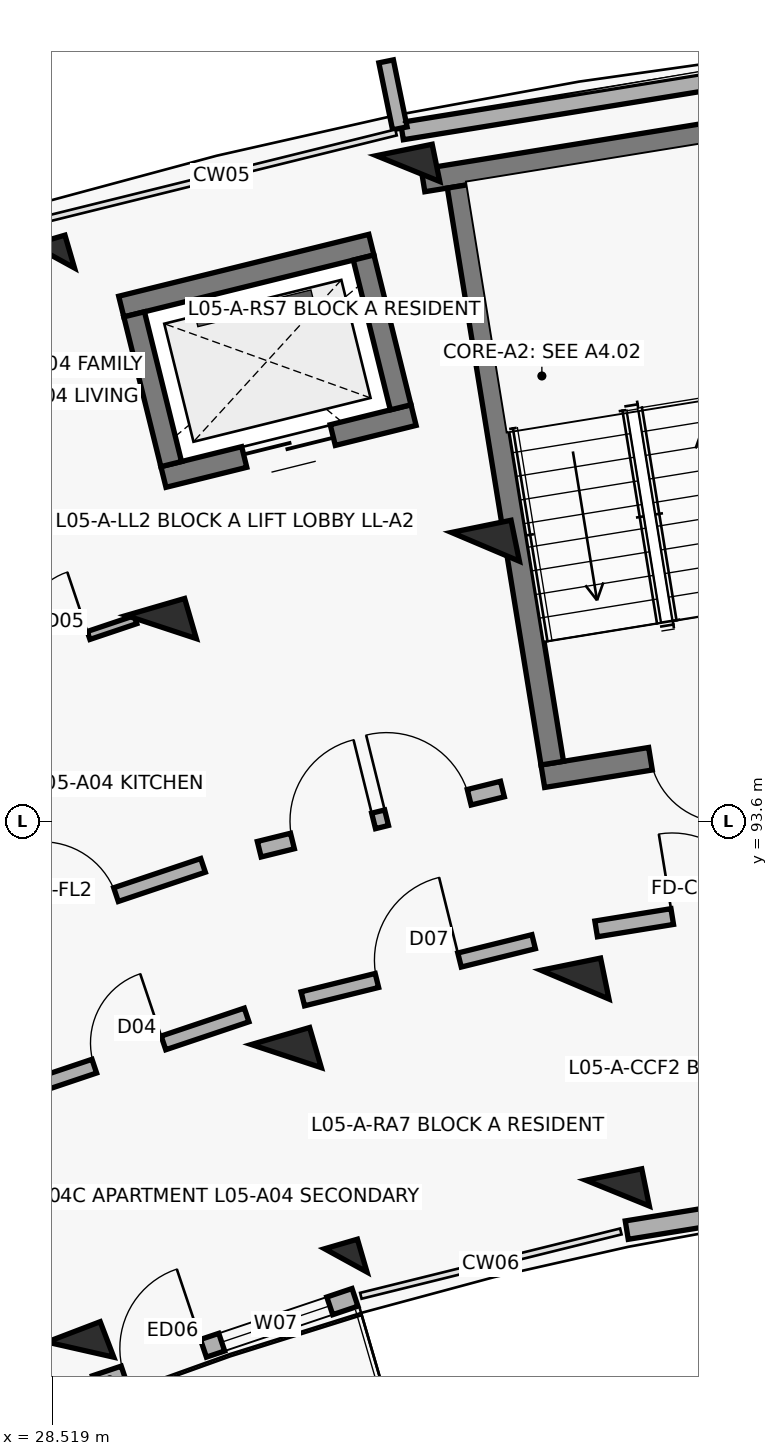
"""IFC4 building model, lengths in metres.
Left out: names, types, materials, properties, quantities, classifications, styles, units other than length and angle.
Written with IfcOpenShell. Run it as: python <this file> out.ifc"""

import sys

from ifc_helpers import new_model, si_unit, direction, frame, frame_2d, origin, origin_2d, place, context, subcontext, project, spatial, rectangle, extrude, element, fill, save


model = new_model("IFC4")
c1 = context("Model", 3, precision=1e-05, world=origin(), true_north=direction((0.0, 1.0)))
c2 = subcontext(c1, "Body", "Model", "MODEL_VIEW")
j1 = project(units=[si_unit("LENGTHUNIT", "METRE"), si_unit("PLANEANGLEUNIT", "RADIAN")], contexts=[c1])
p1 = place(None, origin())
s1 = spatial("IfcSite", under=j1, at=p1, CompositionType="ELEMENT")
p2 = place(p1, origin())
s2 = spatial("IfcBuilding", under=s1, at=p2, CompositionType="ELEMENT")
p3 = place(p2, frame((0.0, 0.0, 17.4)))
s3 = spatial("IfcBuildingStorey", under=s2, at=p3, CompositionType="ELEMENT", Elevation=17.4)
p4 = place(p3, frame((28.889, 86.646, 0.0), z_axis=(0.0, 0.0, 1.0), x_axis=(-0.357064076459, 0.934079892355, 0.0)))
e1 = element("IfcColumn", 1, at=p4, inside=s3, PredefinedType="COLUMN", context=c2, shape_type="SweptSolid", body=[
    extrude(rectangle(XDim=0.5, YDim=0.75, at=origin_2d()), origin(), (0.0, 0.0, 1.0), 3.1),
])
p5 = place(p3, frame((32.382, 87.82, 0.0), z_axis=(0.0, 0.0, 1.0), x_axis=(-0.27966144946, 0.96009867914, 0.0)))
e2 = element("IfcColumn", 2, at=p5, inside=s3, PredefinedType="COLUMN", context=c2, shape_type="SweptSolid", body=[
    extrude(rectangle(XDim=0.45, YDim=0.45, at=origin_2d()), origin(), (0.0, 0.0, 1.0), 3.1),
])
for number, where, z_axis, x_axis in (
    (3, (31.599, 90.508, 0.0), (0.0, 0.0, 1.0), (-0.28, 0.96, 0.0)),
    (4, (29.954, 96.153, 0.0), (0.0, 0.0, 1.0), (-0.28, 0.96, 0.0)),
):
    element("IfcColumn", number, at=place(p3, frame(where, z_axis=z_axis, x_axis=x_axis)), inside=s3, PredefinedType="COLUMN", context=c2, shape_type="SweptSolid", body=[
        extrude(rectangle(XDim=0.55, YDim=0.8, at=origin_2d()), origin(), (0.0, 0.0, 1.0), 3.1),
    ])
p6 = place(p3, frame((28.533, 101.031, 0.0), z_axis=(0.0, 0.0, 1.0), x_axis=(-0.27966144946, 0.96009867914, 0.0)))
e5 = element("IfcColumn", 5, at=p6, inside=s3, PredefinedType="COLUMN", context=c2, shape_type="SweptSolid", body=[
    extrude(rectangle(XDim=0.45, YDim=0.45, at=origin_2d()), origin(), (0.0, 0.0, 1.0), 3.1),
])
p7 = place(p3, frame((35.958, 88.705, 0.0), z_axis=(0.0, 0.0, 1.0), x_axis=(-0.200393999665, 0.979715389742, 0.0)))
e6 = element("IfcColumn", 6, at=p7, inside=s3, PredefinedType="COLUMN", context=c2, shape_type="SweptSolid", body=[
    extrude(rectangle(XDim=0.5, YDim=0.75, at=origin_2d()), origin(), (0.0, 0.0, 1.0), 3.1),
])
for number, where, z_axis, x_axis in (
    (7, (35.397, 91.448, 0.0), (0.0, 0.0, 1.0), (-0.2, 0.98, 0.0)),
    (8, (34.219, 97.209, 0.0), (0.0, 0.0, 1.0), (-0.2, 0.98, 0.0)),
):
    element("IfcColumn", number, at=place(p3, frame(where, z_axis=z_axis, x_axis=x_axis)), inside=s3, PredefinedType="COLUMN", context=c2, shape_type="SweptSolid", body=[
        extrude(rectangle(XDim=0.55, YDim=0.8, at=origin_2d()), origin(), (0.0, 0.0, 1.0), 3.1),
    ])
p8 = place(p3, frame((33.201, 102.186, 0.0), z_axis=(0.0, 0.0, 1.0), x_axis=(-0.200393999665, 0.979715389742, 0.0)))
e9 = element("IfcColumn", 9, at=p8, inside=s3, PredefinedType="COLUMN", context=c2, shape_type="SweptSolid", body=[
    extrude(rectangle(XDim=0.5, YDim=0.75, at=origin_2d()), origin(), (0.0, 0.0, 1.0), 3.1),
])
p9 = place(p3, frame((29.087, 86.185, 0.0), z_axis=(0.0, 0.0, 1.0), x_axis=(0.947880824442, 0.318625081649, 0.0)))
e10 = element("IfcWall", 10, at=p9, inside=s3, PredefinedType="SOLIDWALL", context=c2, shape_type="SweptSolid", body=[
    extrude(rectangle(XDim=3.604, YDim=0.245, at=frame_2d((1.802, 0.0))), origin(), (0.0, 0.0, 1.0), 2.25),
])
p10 = place(p9, frame((0.4, 0.0, 0.0)))
e11 = element("IfcOpeningElement", 11, at=p10, cuts=e10, PredefinedType="OPENING", context=c2, shape_type="SweptSolid", body=[
    extrude(rectangle(XDim=1.1, YDim=2.15, at=frame_2d((0.55, 1.075))), frame((0.0, 0.133, 0.0), z_axis=(0.0, -1.0, 0.0), x_axis=(1.0, 0.0, 0.0)), (0.0, 0.0, 1.0), 0.265),
])
p11 = place(p9, frame((1.754, 0.0, 0.35)))
e12 = element("IfcOpeningElement", 12, at=p11, cuts=e10, PredefinedType="OPENING", context=c2, shape_type="SweptSolid", body=[
    extrude(rectangle(XDim=1.5, YDim=1.65, at=frame_2d((0.75, 0.825))), frame((0.0, 0.133, 0.0), z_axis=(0.0, -1.0, 0.0), x_axis=(1.0, 0.0, 0.0)), (0.0, 0.0, 1.0), 0.265),
])
p12 = place(p3, frame((33.12, 102.679, 0.0), z_axis=(0.0, 0.0, 1.0), x_axis=(0.987080750493, 0.160223568819, 0.0)))
e13 = element("IfcWall", 13, at=p12, inside=s3, PredefinedType="SOLIDWALL", context=c2, shape_type="SweptSolid", body=[
    extrude(rectangle(XDim=4.809, YDim=0.23, at=frame_2d((2.404, 0.0))), origin(), (0.0, 0.0, 1.0), 2.25),
])
p13 = place(p3, frame((33.093, 102.715, 0.0), z_axis=(0.0, 0.0, 1.0), x_axis=(-0.200183211319, 0.979758481416, 0.0)))
e14 = element("IfcWall", 14, at=p13, inside=s3, PredefinedType="PARAPET", context=c2, shape_type="SweptSolid", body=[
    extrude(rectangle(XDim=0.9, YDim=0.195, at=frame_2d((0.45, 0.0))), origin(), (0.0, 0.0, 1.0), 2.25),
])
p14 = place(p3, frame((36.078, 88.218, 0.0), z_axis=(0.0, 0.0, 1.0), x_axis=(0.987080874485, 0.160222804952, 0.0)))
e15 = element("IfcWall", 15, at=p14, inside=s3, PredefinedType="SOLIDWALL", context=c2, shape_type="SweptSolid", body=[
    extrude(rectangle(XDim=3.604, YDim=0.245, at=frame_2d((1.802, 0.0))), origin(), (0.0, 0.0, 1.0), 2.25),
])
p15 = place(p14, frame((1.002, 0.0, 0.32)))
e16 = element("IfcOpeningElement", 16, at=p15, cuts=e15, PredefinedType="OPENING", context=c2, shape_type="SweptSolid", body=[
    extrude(rectangle(XDim=1.6, YDim=1.5, at=frame_2d((0.8, 0.75))), frame((0.0, 0.133, 0.0), z_axis=(0.0, -1.0, 0.0), x_axis=(1.0, 0.0, 0.0)), (0.0, 0.0, 1.0), 0.265),
])
p16 = place(p3, frame((38.794, 94.811, 0.0), z_axis=(0.0, 0.0, 1.0), x_axis=(-0.987077443397, -0.160243941341, 0.0)))
e17 = element("IfcWall", 17, at=p16, inside=s3, PredefinedType="SHEAR", context=c2, shape_type="SweptSolid", body=[
    extrude(rectangle(XDim=3.87, YDim=0.3, at=frame_2d((1.935, 0.0))), origin(), (0.0, 0.0, 1.0), 3.1),
])
p17 = place(p16, frame((1.435, 0.0, 0.0)))
e18 = element("IfcOpeningElement", 18, at=p17, cuts=e17, PredefinedType="OPENING", context=c2, shape_type="SweptSolid", body=[
    extrude(rectangle(XDim=1.0, YDim=2.15, at=frame_2d((0.5, 1.075))), frame((0.0, 0.16, 0.0), z_axis=(0.0, -1.0, 0.0), x_axis=(1.0, 0.0, 0.0)), (0.0, 0.0, 1.0), 0.32),
])
p18 = place(p3, frame((37.81, 102.745, 0.0), z_axis=(0.0, 0.0, 1.0), x_axis=(-0.987084710126, -0.160199173019, 0.0)))
e19 = element("IfcWall", 19, at=p18, inside=s3, PredefinedType="SHEAR", context=c2, shape_type="SweptSolid", body=[
    extrude(rectangle(XDim=4.47, YDim=0.3, at=frame_2d((2.235, 0.0))), origin(), (0.0, 0.0, 1.0), 3.1),
])
p19 = place(p3, frame((35.098, 94.363, 0.0), z_axis=(0.0, 0.0, 1.0), x_axis=(-0.160227496777, 0.987080112897, 0.0)))
e20 = element("IfcWall", 20, at=p19, inside=s3, PredefinedType="SHEAR", context=c2, shape_type="SweptSolid", body=[
    extrude(rectangle(XDim=7.69, YDim=0.3, at=frame_2d((3.845, 0.0))), origin(), (0.0, 0.0, 1.0), 3.1),
])
p20 = place(p3, frame((33.273, 98.942, 0.0), z_axis=(0.0, 0.0, 1.0), x_axis=(-0.970707542441, -0.240264160972, 0.0)))
e21 = element("IfcWall", 21, at=p20, inside=s3, PredefinedType="SHEAR", context=c2, shape_type="SweptSolid", body=[
    extrude(rectangle(XDim=3.39, YDim=0.28, at=frame_2d((1.695, 0.0))), origin(), (0.0, 0.0, 1.0), 3.1),
])
p21 = place(p20, frame((1.095, 0.0, 0.0)))
e22 = element("IfcOpeningElement", 22, at=p21, cuts=e21, PredefinedType="OPENING", context=c2, shape_type="SweptSolid", body=[
    extrude(rectangle(XDim=1.2, YDim=2.15, at=frame_2d((0.6, 1.075))), frame((0.0, 0.15, 0.0), z_axis=(0.0, -1.0, 0.0), x_axis=(1.0, 0.0, 0.0)), (0.0, 0.0, 1.0), 0.3),
])
p22 = place(p3, frame((32.718, 101.185, 0.0), z_axis=(0.0, 0.0, 1.0), x_axis=(-0.970711699588, -0.240247364777, 0.0)))
e23 = element("IfcWall", 23, at=p22, inside=s3, PredefinedType="SHEAR", context=c2, shape_type="SweptSolid", body=[
    extrude(rectangle(XDim=3.39, YDim=0.28, at=frame_2d((1.695, 0.0))), origin(), (0.0, 0.0, 1.0), 3.1),
])
p23 = place(p3, frame((33.104, 99.044, 0.0), z_axis=(0.0, 0.0, 1.0), x_axis=(-0.240186044774, 0.970726873995, 0.0)))
e24 = element("IfcWall", 24, at=p23, inside=s3, PredefinedType="SHEAR", context=c2, shape_type="SweptSolid", body=[
    extrude(rectangle(XDim=2.03, YDim=0.28, at=frame_2d((1.015, 0.0))), origin(), (0.0, 0.0, 1.0), 3.1),
])
p24 = place(p3, frame((30.085, 98.297, 0.0), z_axis=(0.0, 0.0, 1.0), x_axis=(-0.2402993748, 0.970698825832, 0.0)))
e25 = element("IfcWall", 25, at=p24, inside=s3, PredefinedType="SHEAR", context=c2, shape_type="SweptSolid", body=[
    extrude(rectangle(XDim=2.03, YDim=0.28, at=frame_2d((1.015, 0.0))), origin(), (0.0, 0.0, 1.0), 3.1),
])
p25 = place(p3, frame((27.247, 91.923, 0.0), z_axis=(0.0, 0.0, 1.0), x_axis=(0.947863007629, 0.318678080151, 0.0)))
e26 = element("IfcWall", 26, at=p25, inside=s3, PredefinedType="SOLIDWALL", context=c2, shape_type="SweptSolid", body=[
    extrude(rectangle(XDim=3.436, YDim=0.19, at=frame_2d((1.718, 0.0))), origin(), (0.0, 0.0, 1.0), 2.08),
])
p26 = place(p25, frame((1.208, 0.0, 0.0)))
e27 = element("IfcOpeningElement", 27, at=p26, cuts=e26, PredefinedType="OPENING", context=c2, shape_type="SweptSolid", body=[
    extrude(rectangle(XDim=1.02, YDim=2.15, at=frame_2d((0.51, 1.075))), frame((0.0, 0.105, 0.0), z_axis=(0.0, -1.0, 0.0), x_axis=(1.0, 0.0, 0.0)), (0.0, 0.0, 1.0), 0.21),
])
p27 = place(p3, frame((27.979, 90.008, 0.0), z_axis=(0.0, 0.0, 1.0), x_axis=(0.94787351033, 0.318646839643, 0.0)))
e28 = element("IfcWall", 28, at=p27, inside=s3, PredefinedType="SOLIDWALL", context=c2, shape_type="SweptSolid", body=[
    extrude(rectangle(XDim=3.269, YDim=0.19, at=frame_2d((1.634, 0.0))), origin(), (0.0, 0.0, 1.0), 2.08),
])
p28 = place(p27, frame((1.154, 0.0, 0.0)))
e29 = element("IfcOpeningElement", 29, at=p28, cuts=e28, PredefinedType="OPENING", context=c2, shape_type="SweptSolid", body=[
    extrude(rectangle(XDim=0.96, YDim=2.1, at=frame_2d((0.48, 1.05))), frame((0.0, 0.105, 0.0), z_axis=(0.0, -1.0, 0.0), x_axis=(1.0, 0.0, 0.0)), (0.0, 0.0, 1.0), 0.21),
])
p29 = place(p3, frame((26.003, 95.036, 0.0), z_axis=(0.0, 0.0, 1.0), x_axis=(0.947879193428, 0.318629933725, 0.0)))
e30 = element("IfcWall", 30, at=p29, inside=s3, PredefinedType="PARTITIONING", context=c2, shape_type="SweptSolid", body=[
    extrude(rectangle(XDim=3.81, YDim=0.11, at=frame_2d((1.905, 0.0))), origin(), (0.0, 0.0, 1.0), 2.08),
])
p30 = place(p29, frame((0.65, 0.0, 0.0)))
e31 = element("IfcOpeningElement", 31, at=p30, cuts=e30, PredefinedType="OPENING", context=c2, shape_type="SweptSolid", body=[
    extrude(rectangle(XDim=0.9, YDim=2.1, at=frame_2d((0.45, 1.05))), frame((0.0, 0.065, 0.0), z_axis=(0.0, -1.0, 0.0), x_axis=(1.0, 0.0, 0.0)), (0.0, 0.0, 1.0), 0.13),
])
p31 = place(p29, frame((2.28, 0.0, 0.0)))
e32 = element("IfcOpeningElement", 32, at=p31, cuts=e30, PredefinedType="OPENING", context=c2, shape_type="SweptSolid", body=[
    extrude(rectangle(XDim=0.88, YDim=2.1, at=frame_2d((0.44, 1.05))), frame((0.0, 0.065, 0.0), z_axis=(0.0, -1.0, 0.0), x_axis=(1.0, 0.0, 0.0)), (0.0, 0.0, 1.0), 0.13),
])
p32 = place(p3, frame((31.243, 93.23, 0.0), z_axis=(0.0, 0.0, 1.0), x_axis=(0.970719238682, 0.240216901263, 0.0)))
e33 = element("IfcWall", 33, at=p32, inside=s3, PredefinedType="SOLIDWALL", context=c2, shape_type="SweptSolid", body=[
    extrude(rectangle(XDim=3.296, YDim=0.21, at=frame_2d((1.648, 0.0))), origin(), (0.0, 0.0, 1.0), 2.08),
])
p33 = place(p32, frame((0.45, 0.0, 0.0)))
e34 = element("IfcOpeningElement", 34, at=p33, cuts=e33, PredefinedType="OPENING", context=c2, shape_type="SweptSolid", body=[
    extrude(rectangle(XDim=1.1, YDim=2.15, at=frame_2d((0.55, 1.075))), frame((0.0, 0.115, 0.0), z_axis=(0.0, -1.0, 0.0), x_axis=(1.0, 0.0, 0.0)), (0.0, 0.0, 1.0), 0.23),
])
p34 = place(p32, frame((1.726, 0.0, 0.0)))
e35 = element("IfcOpeningElement", 35, at=p34, cuts=e33, PredefinedType="OPENING", context=c2, shape_type="SweptSolid", body=[
    extrude(rectangle(XDim=1.12, YDim=2.15, at=frame_2d((0.56, 1.075))), frame((0.0, 0.115, 0.0), z_axis=(0.0, -1.0, 0.0), x_axis=(1.0, 0.0, 0.0)), (0.0, 0.0, 1.0), 0.23),
])
p35 = place(p3, frame((31.816, 91.262, 0.0), z_axis=(0.0, 0.0, 1.0), x_axis=(0.970727194092, 0.240184751078, 0.0)))
e36 = element("IfcWall", 36, at=p35, inside=s3, PredefinedType="SOLIDWALL", context=c2, shape_type="SweptSolid", body=[
    extrude(rectangle(XDim=3.129, YDim=0.19, at=frame_2d((1.564, 0.0))), origin(), (0.0, 0.0, 1.0), 2.08),
])
p36 = place(p35, frame((1.004, 0.0, 0.0)))
e37 = element("IfcOpeningElement", 37, at=p36, cuts=e36, PredefinedType="OPENING", context=c2, shape_type="SweptSolid", body=[
    extrude(rectangle(XDim=1.12, YDim=2.15, at=frame_2d((0.56, 1.075))), frame((0.0, 0.105, 0.0), z_axis=(0.0, -1.0, 0.0), x_axis=(1.0, 0.0, 0.0)), (0.0, 0.0, 1.0), 0.21),
])
p37 = place(p3, frame((35.676, 92.181, 0.0), z_axis=(0.0, 0.0, 1.0), x_axis=(0.98707079686, 0.160284877599, 0.0)))
e38 = element("IfcWall", 38, at=p37, inside=s3, PredefinedType="SOLIDWALL", context=c2, shape_type="SweptSolid", body=[
    extrude(rectangle(XDim=3.129, YDim=0.21, at=frame_2d((1.564, 0.0))), origin(), (0.0, 0.0, 1.0), 2.08),
])
p38 = place(p37, frame((1.014, 0.0, 0.0)))
e39 = element("IfcOpeningElement", 39, at=p38, cuts=e38, PredefinedType="OPENING", context=c2, shape_type="SweptSolid", body=[
    extrude(rectangle(XDim=1.1, YDim=2.15, at=frame_2d((0.55, 1.075))), frame((0.0, 0.115, 0.0), z_axis=(0.0, -1.0, 0.0), x_axis=(1.0, 0.0, 0.0)), (0.0, 0.0, 1.0), 0.23),
])
p39 = place(p10, origin())
e40 = element("IfcDoor", 40, at=p39, inside=s3, OperationType="SINGLE_SWING_RIGHT", PredefinedType="DOOR", context=c2, shape_type="SweptSolid", body=[
    extrude(rectangle(XDim=1.1, YDim=2.15, at=frame_2d((0.55, 1.075))), frame((0.0, 0.025, 0.0), z_axis=(0.0, -1.0, 0.0), x_axis=(1.0, 0.0, 0.0)), (0.0, 0.0, 1.0), 0.05),
])
fill(e11, e40)
p40 = place(p11, origin())
e41 = element("IfcWindow", 41, at=p40, inside=s3, PartitioningType="DOUBLE_PANEL_VERTICAL", PredefinedType="WINDOW", context=c2, shape_type="SweptSolid", body=[
    extrude(rectangle(XDim=1.5, YDim=1.65, at=frame_2d((0.75, 0.825))), frame((0.0, 0.03, 0.0), z_axis=(0.0, -1.0, 0.0), x_axis=(1.0, 0.0, 0.0)), (0.0, 0.0, 1.0), 0.06),
])
fill(e12, e41)
p41 = place(p17, origin())
e42 = element("IfcDoor", 42, at=p41, inside=s3, OperationType="SINGLE_SWING_LEFT", PredefinedType="DOOR", context=c2, shape_type="SweptSolid", body=[
    extrude(rectangle(XDim=1.0, YDim=2.15, at=frame_2d((0.5, 1.075))), frame((0.0, 0.025, 0.0), z_axis=(0.0, -1.0, 0.0), x_axis=(1.0, 0.0, 0.0)), (0.0, 0.0, 1.0), 0.05),
])
fill(e18, e42)
p42 = place(p21, origin())
e43 = element("IfcDoor", 43, at=p42, inside=s3, OperationType="DOUBLE_DOOR_SLIDING", PredefinedType="DOOR", context=c2, shape_type="SweptSolid", body=[
    extrude(rectangle(XDim=1.2, YDim=2.15, at=frame_2d((0.6, 1.075))), frame((0.0, 0.025, 0.0), z_axis=(0.0, -1.0, 0.0), x_axis=(1.0, 0.0, 0.0)), (0.0, 0.0, 1.0), 0.05),
])
fill(e22, e43)
p43 = place(p26, origin())
e44 = element("IfcDoor", 44, at=p43, inside=s3, OperationType="SINGLE_SWING_LEFT", PredefinedType="DOOR", context=c2, shape_type="SweptSolid", body=[
    extrude(rectangle(XDim=1.02, YDim=2.15, at=frame_2d((0.51, 1.075))), frame((0.0, 0.025, 0.0), z_axis=(0.0, -1.0, 0.0), x_axis=(1.0, 0.0, 0.0)), (0.0, 0.0, 1.0), 0.05),
])
fill(e27, e44)
p44 = place(p28, origin())
e45 = element("IfcDoor", 45, at=p44, inside=s3, OperationType="SINGLE_SWING_RIGHT", PredefinedType="DOOR", context=c2, shape_type="SweptSolid", body=[
    extrude(rectangle(XDim=0.96, YDim=2.1, at=frame_2d((0.48, 1.05))), frame((0.0, 0.025, 0.0), z_axis=(0.0, -1.0, 0.0), x_axis=(1.0, 0.0, 0.0)), (0.0, 0.0, 1.0), 0.05),
])
fill(e29, e45)
p45 = place(p31, origin())
e46 = element("IfcDoor", 46, at=p45, inside=s3, OperationType="SINGLE_SWING_RIGHT", PredefinedType="DOOR", context=c2, shape_type="SweptSolid", body=[
    extrude(rectangle(XDim=0.88, YDim=2.1, at=frame_2d((0.44, 1.05))), frame((0.0, 0.025, 0.0), z_axis=(0.0, -1.0, 0.0), x_axis=(1.0, 0.0, 0.0)), (0.0, 0.0, 1.0), 0.05),
])
fill(e32, e46)
p46 = place(p33, origin())
e47 = element("IfcDoor", 47, at=p46, inside=s3, OperationType="SINGLE_SWING_RIGHT", PredefinedType="DOOR", context=c2, shape_type="SweptSolid", body=[
    extrude(rectangle(XDim=1.1, YDim=2.15, at=frame_2d((0.55, 1.075))), frame((0.0, 0.025, 0.0), z_axis=(0.0, -1.0, 0.0), x_axis=(1.0, 0.0, 0.0)), (0.0, 0.0, 1.0), 0.05),
])
fill(e34, e47)
p47 = place(p34, origin())
e48 = element("IfcDoor", 48, at=p47, inside=s3, OperationType="SINGLE_SWING_LEFT", PredefinedType="DOOR", context=c2, shape_type="SweptSolid", body=[
    extrude(rectangle(XDim=1.12, YDim=2.15, at=frame_2d((0.56, 1.075))), frame((0.0, 0.025, 0.0), z_axis=(0.0, -1.0, 0.0), x_axis=(1.0, 0.0, 0.0)), (0.0, 0.0, 1.0), 0.05),
])
fill(e35, e48)
p48 = place(p36, origin())
e49 = element("IfcDoor", 49, at=p48, inside=s3, OperationType="SINGLE_SWING_RIGHT", PredefinedType="DOOR", context=c2, shape_type="SweptSolid", body=[
    extrude(rectangle(XDim=1.12, YDim=2.15, at=frame_2d((0.56, 1.075))), frame((0.0, 0.025, 0.0), z_axis=(0.0, -1.0, 0.0), x_axis=(1.0, 0.0, 0.0)), (0.0, 0.0, 1.0), 0.05),
])
fill(e37, e49)
p49 = place(p38, origin())
e50 = element("IfcDoor", 50, at=p49, inside=s3, OperationType="SINGLE_SWING_LEFT", PredefinedType="DOOR", context=c2, shape_type="SweptSolid", body=[
    extrude(rectangle(XDim=1.1, YDim=2.15, at=frame_2d((0.55, 1.075))), frame((0.0, 0.025, 0.0), z_axis=(0.0, -1.0, 0.0), x_axis=(1.0, 0.0, 0.0)), (0.0, 0.0, 1.0), 0.05),
])
fill(e39, e50)
save(model, sys.argv[1])
